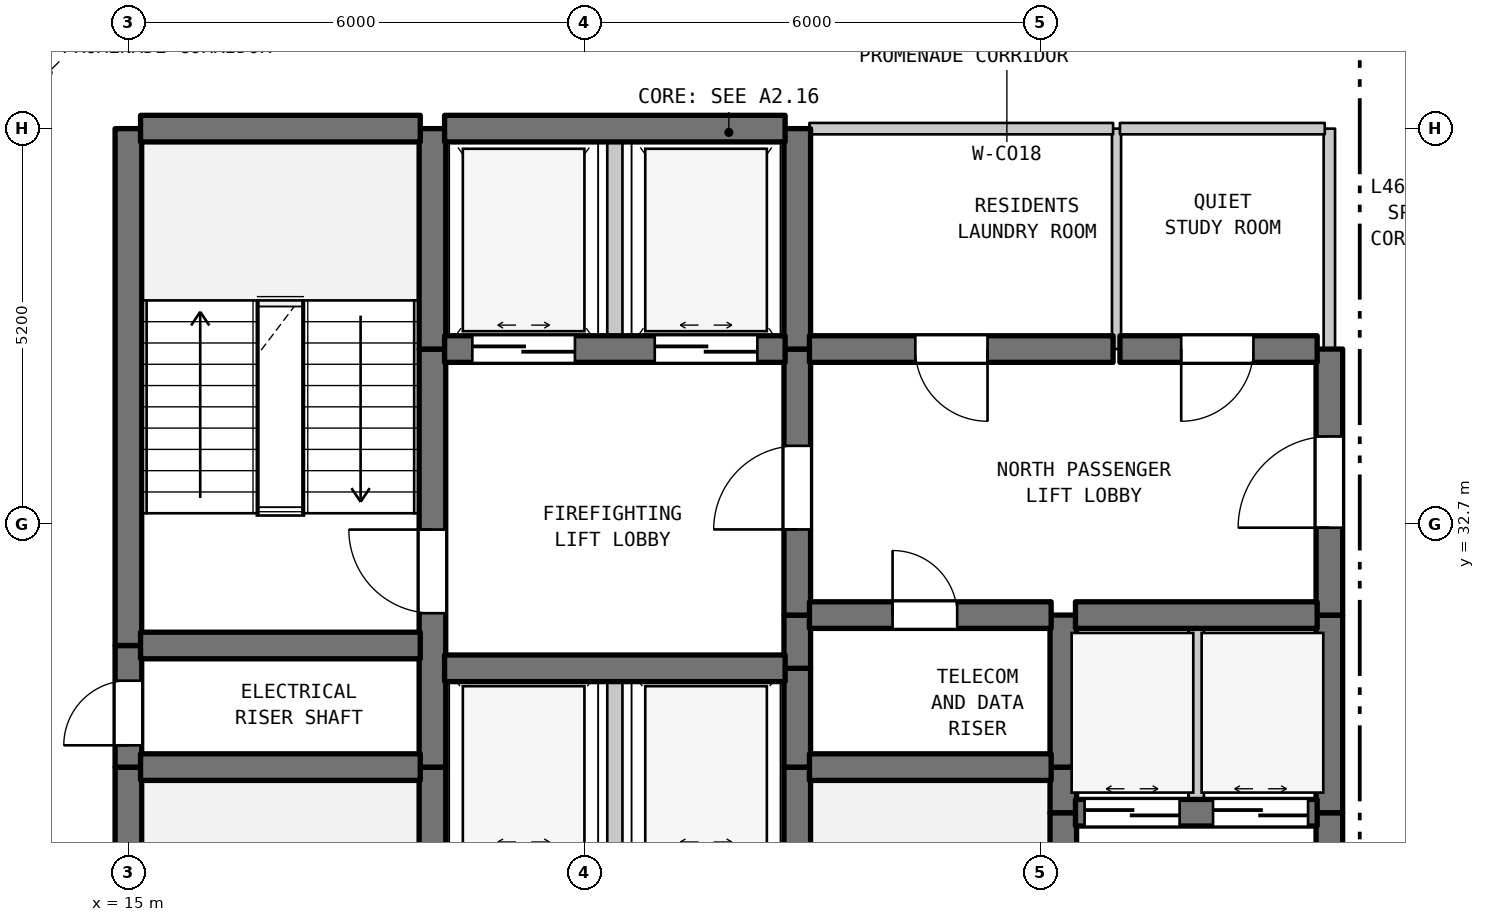
"""IFC4 building model, lengths in metres.
Left out: names, types, materials, properties, quantities, classifications, styles, units other than length and angle.
Written with IfcOpenShell. Run it as: python <this file> out.ifc"""

import sys

from ifc_helpers import new_model, si_unit, direction, frame, frame_2d, origin, place, context, subcontext, project, spatial, rectangle, extrude, element, fill, save


model = new_model("IFC4")
c1 = context("Model", 3, precision=1e-05, world=origin(), true_north=direction((0.0, 1.0)))
c2 = subcontext(c1, "Body", "Model", "MODEL_VIEW")
j1 = project(units=[si_unit("LENGTHUNIT", "METRE"), si_unit("PLANEANGLEUNIT", "RADIAN")], contexts=[c1])
p1 = place(None, origin())
s1 = spatial("IfcSite", under=j1, at=p1, CompositionType="ELEMENT")
p2 = place(p1, origin())
s2 = spatial("IfcBuilding", under=s1, at=p2, CompositionType="ELEMENT")
p3 = place(p2, frame((0.0, 0.0, 188.4)))
s3 = spatial("IfcBuildingStorey", under=s2, at=p3, CompositionType="ELEMENT", Elevation=188.4)
p4 = place(p3, frame((15.0, 22.7, 0.0), z_axis=(0.0, 0.0, 1.0), x_axis=(0.0, 1.0, 0.0)))
e1 = element("IfcWall", 1, at=p4, inside=s3, PredefinedType="SHEAR", context=c2, shape_type="SweptSolid", body=[
    extrude(rectangle(XDim=6.8, YDim=0.35, at=frame_2d((3.4, 0.0))), origin(), (0.0, 0.0, 1.0), 3.39),
])
p5 = place(p3, frame((15.0, 29.5, 0.0), z_axis=(0.0, 0.0, 1.0), x_axis=(0.0, 1.0, 0.0)))
e2 = element("IfcWall", 2, at=p5, inside=s3, PredefinedType="SHEAR", context=c2, shape_type="SweptSolid", body=[
    extrude(rectangle(XDim=1.6, YDim=0.35, at=frame_2d((0.8, 0.0))), origin(), (0.0, 0.0, 1.0), 3.39),
])
p6 = place(p5, frame((0.287, 0.0, 0.0)))
e3 = element("IfcOpeningElement", 3, at=p6, cuts=e2, PredefinedType="OPENING", context=c2, shape_type="SweptSolid", body=[
    extrude(rectangle(XDim=0.85, YDim=2.1, at=frame_2d((0.425, 1.05))), frame((0.0, 0.185, 0.0), z_axis=(0.0, -1.0, 0.0), x_axis=(1.0, 0.0, 0.0)), (0.0, 0.0, 1.0), 0.37),
])
p7 = place(p3, frame((15.0, 31.1, 0.0), z_axis=(0.0, 0.0, 1.0), x_axis=(0.0, 1.0, 0.0)))
e4 = element("IfcWall", 4, at=p7, inside=s3, PredefinedType="SHEAR", context=c2, shape_type="SweptSolid", body=[
    extrude(rectangle(XDim=6.8, YDim=0.35, at=frame_2d((3.4, 0.0))), origin(), (0.0, 0.0, 1.0), 3.39),
])
p8 = place(p3, frame((19.0, 28.2, 0.0), z_axis=(0.0, 0.0, 1.0), x_axis=(0.0, 1.0, 0.0)))
e5 = element("IfcWall", 5, at=p8, inside=s3, PredefinedType="SHEAR", context=c2, shape_type="SweptSolid", body=[
    extrude(rectangle(XDim=1.3, YDim=0.35, at=frame_2d((0.65, 0.0))), origin(), (0.0, 0.0, 1.0), 3.39),
])
p9 = place(p3, frame((19.0, 29.5, 0.0), z_axis=(0.0, 0.0, 1.0), x_axis=(0.0, 1.0, 0.0)))
e6 = element("IfcWall", 6, at=p9, inside=s3, PredefinedType="SHEAR", context=c2, shape_type="SweptSolid", body=[
    extrude(rectangle(XDim=5.5, YDim=0.35, at=frame_2d((2.75, 0.0))), origin(), (0.0, 0.0, 1.0), 3.39),
])
p10 = place(p9, frame((2.025, 0.0, 0.0)))
e7 = element("IfcOpeningElement", 7, at=p10, cuts=e6, PredefinedType="OPENING", context=c2, shape_type="SweptSolid", body=[
    extrude(rectangle(XDim=1.1, YDim=2.15, at=frame_2d((0.55, 1.075))), frame((0.0, 0.185, 0.0), z_axis=(0.0, -1.0, 0.0), x_axis=(1.0, 0.0, 0.0)), (0.0, 0.0, 1.0), 0.37),
])
p11 = place(p3, frame((19.0, 35.0, 0.0), z_axis=(0.0, 0.0, 1.0), x_axis=(0.0, 1.0, 0.0)))
e8 = element("IfcWall", 8, at=p11, inside=s3, PredefinedType="SHEAR", context=c2, shape_type="SweptSolid", body=[
    extrude(rectangle(XDim=2.9, YDim=0.35, at=frame_2d((1.45, 0.0))), origin(), (0.0, 0.0, 1.0), 3.39),
])
p12 = place(p3, frame((21.4, 28.2, 0.0), z_axis=(0.0, 0.0, 1.0), x_axis=(0.0, 1.0, 0.0)))
e9 = element("IfcWall", 9, at=p12, inside=s3, PredefinedType="STANDARD", context=c2, shape_type="SweptSolid", body=[
    extrude(rectangle(XDim=2.6, YDim=0.2, at=frame_2d((1.3, 0.0))), origin(), (0.0, 0.0, 1.0), 3.39),
])
p13 = place(p3, frame((21.4, 35.0, 0.0), z_axis=(0.0, 0.0, 1.0), x_axis=(0.0, 1.0, 0.0)))
e10 = element("IfcWall", 10, at=p13, inside=s3, PredefinedType="STANDARD", context=c2, shape_type="SweptSolid", body=[
    extrude(rectangle(XDim=2.9, YDim=0.2, at=frame_2d((1.45, 0.0))), origin(), (0.0, 0.0, 1.0), 3.39),
])
for number, where, z_axis, x_axis in (
    (11, (23.8, 28.2, 0.0), (0.0, 0.0, 1.0), (0.0, 1.0, 0.0)),
    (12, (23.8, 29.5, 0.0), (0.0, 0.0, 1.0), (0.0, 1.0, 0.0)),
):
    element("IfcWall", number, at=place(p3, frame(where, z_axis=z_axis, x_axis=x_axis)), inside=s3, PredefinedType="SHEAR", context=c2, shape_type="SweptSolid", body=[
        extrude(rectangle(XDim=1.3, YDim=0.35, at=frame_2d((0.65, 0.0))), origin(), (0.0, 0.0, 1.0), 3.39),
    ])
p14 = place(p3, frame((23.8, 30.8, 0.0), z_axis=(0.0, 0.0, 1.0), x_axis=(0.0, 1.0, 0.0)))
e13 = element("IfcWall", 13, at=p14, inside=s3, PredefinedType="SHEAR", context=c2, shape_type="SweptSolid", body=[
    extrude(rectangle(XDim=0.7, YDim=0.35, at=frame_2d((0.35, 0.0))), origin(), (0.0, 0.0, 1.0), 3.39),
])
p15 = place(p3, frame((23.8, 31.5, 0.0), z_axis=(0.0, 0.0, 1.0), x_axis=(0.0, 1.0, 0.0)))
e14 = element("IfcWall", 14, at=p15, inside=s3, PredefinedType="SHEAR", context=c2, shape_type="SweptSolid", body=[
    extrude(rectangle(XDim=3.5, YDim=0.35, at=frame_2d((1.75, 0.0))), origin(), (0.0, 0.0, 1.0), 3.39),
])
p16 = place(p15, frame((1.127, 0.0, 0.0)))
e15 = element("IfcOpeningElement", 15, at=p16, cuts=e14, PredefinedType="OPENING", context=c2, shape_type="SweptSolid", body=[
    extrude(rectangle(XDim=1.1, YDim=2.15, at=frame_2d((0.55, 1.075))), frame((0.0, 0.185, 0.0), z_axis=(0.0, -1.0, 0.0), x_axis=(1.0, 0.0, 0.0)), (0.0, 0.0, 1.0), 0.37),
])
p17 = place(p3, frame((23.8, 35.0, 0.0), z_axis=(0.0, 0.0, 1.0), x_axis=(0.0, 1.0, 0.0)))
e16 = element("IfcWall", 16, at=p17, inside=s3, PredefinedType="SHEAR", context=c2, shape_type="SweptSolid", body=[
    extrude(rectangle(XDim=2.9, YDim=0.35, at=frame_2d((1.45, 0.0))), origin(), (0.0, 0.0, 1.0), 3.39),
])
p18 = place(p3, frame((27.3, 25.6, 0.0), z_axis=(0.0, 0.0, 1.0), x_axis=(0.0, 1.0, 0.0)))
e17 = element("IfcWall", 17, at=p18, inside=s3, PredefinedType="SHEAR", context=c2, shape_type="SweptSolid", body=[
    extrude(rectangle(XDim=3.3, YDim=0.35, at=frame_2d((1.65, 0.0))), origin(), (0.0, 0.0, 1.0), 3.39),
])
p19 = place(p3, frame((27.3, 28.9, 0.0), z_axis=(0.0, 0.0, 1.0), x_axis=(0.0, 1.0, 0.0)))
e18 = element("IfcWall", 18, at=p19, inside=s3, PredefinedType="SHEAR", context=c2, shape_type="SweptSolid", body=[
    extrude(rectangle(XDim=0.6, YDim=0.35, at=frame_2d((0.3, 0.0))), origin(), (0.0, 0.0, 1.0), 3.39),
])
p20 = place(p3, frame((27.3, 29.5, 0.0), z_axis=(0.0, 0.0, 1.0), x_axis=(0.0, 1.0, 0.0)))
e19 = element("IfcWall", 19, at=p20, inside=s3, PredefinedType="SHEAR", context=c2, shape_type="SweptSolid", body=[
    extrude(rectangle(XDim=2.0, YDim=0.35, at=frame_2d((1.0, 0.0))), origin(), (0.0, 0.0, 1.0), 3.39),
])
p21 = place(p3, frame((28.0, 35.0, 0.0), z_axis=(0.0, 0.0, 1.0), x_axis=(0.0, 1.0, 0.0)))
e20 = element("IfcWall", 20, at=p21, inside=s3, PredefinedType="PARTITIONING", context=c2, shape_type="SweptSolid", body=[
    extrude(rectangle(XDim=2.9, YDim=0.12, at=frame_2d((1.45, 0.0))), origin(), (0.0, 0.0, 1.0), 3.39),
])
p22 = place(p3, frame((29.05, 28.9, 0.0), z_axis=(0.0, 0.0, 1.0), x_axis=(0.0, 1.0, 0.0)))
e21 = element("IfcWall", 21, at=p22, inside=s3, PredefinedType="STANDARD", context=c2, shape_type="SweptSolid", body=[
    extrude(rectangle(XDim=2.6, YDim=0.2, at=frame_2d((1.3, 0.0))), origin(), (0.0, 0.0, 1.0), 3.39),
])
p23 = place(p3, frame((30.8, 25.6, 0.0), z_axis=(0.0, 0.0, 1.0), x_axis=(0.0, 1.0, 0.0)))
e22 = element("IfcWall", 22, at=p23, inside=s3, PredefinedType="SHEAR", context=c2, shape_type="SweptSolid", body=[
    extrude(rectangle(XDim=3.3, YDim=0.35, at=frame_2d((1.65, 0.0))), origin(), (0.0, 0.0, 1.0), 3.39),
])
p24 = place(p23, frame((0.978, 0.0, 0.0)))
e23 = element("IfcOpeningElement", 23, at=p24, cuts=e22, PredefinedType="OPENING", context=c2, shape_type="SweptSolid", body=[
    extrude(rectangle(XDim=1.2, YDim=2.2, at=frame_2d((0.6, 1.1))), frame((0.0, 0.185, 0.0), z_axis=(0.0, -1.0, 0.0), x_axis=(1.0, 0.0, 0.0)), (0.0, 0.0, 1.0), 0.37),
])
p25 = place(p3, frame((30.8, 28.9, 0.0), z_axis=(0.0, 0.0, 1.0), x_axis=(0.0, 1.0, 0.0)))
e24 = element("IfcWall", 24, at=p25, inside=s3, PredefinedType="SHEAR", context=c2, shape_type="SweptSolid", body=[
    extrude(rectangle(XDim=2.6, YDim=0.35, at=frame_2d((1.3, 0.0))), origin(), (0.0, 0.0, 1.0), 3.39),
])
p26 = place(p3, frame((30.8, 31.5, 0.0), z_axis=(0.0, 0.0, 1.0), x_axis=(0.0, 1.0, 0.0)))
e25 = element("IfcWall", 25, at=p26, inside=s3, PredefinedType="SHEAR", context=c2, shape_type="SweptSolid", body=[
    extrude(rectangle(XDim=3.5, YDim=0.35, at=frame_2d((1.75, 0.0))), origin(), (0.0, 0.0, 1.0), 3.39),
])
p27 = place(p26, frame((1.15, 0.0, 0.0)))
e26 = element("IfcOpeningElement", 26, at=p27, cuts=e25, PredefinedType="OPENING", context=c2, shape_type="SweptSolid", body=[
    extrude(rectangle(XDim=1.2, YDim=2.2, at=frame_2d((0.6, 1.1))), frame((0.0, 0.185, 0.0), z_axis=(0.0, -1.0, 0.0), x_axis=(1.0, 0.0, 0.0)), (0.0, 0.0, 1.0), 0.37),
])
p28 = place(p3, frame((30.8, 35.0, 0.0), z_axis=(0.0, 0.0, 1.0), x_axis=(0.0, 1.0, 0.0)))
e27 = element("IfcWall", 27, at=p28, inside=s3, PredefinedType="STANDARD", context=c2, shape_type="SweptSolid", body=[
    extrude(rectangle(XDim=2.9, YDim=0.15, at=frame_2d((1.45, 0.0))), origin(), (0.0, 0.0, 1.0), 3.39),
])
p29 = place(p3, frame((27.46, 28.9, 0.0), z_axis=(0.0, 0.0, 1.0), x_axis=(1.0, 0.0, 0.0)))
e28 = element("IfcWall", 28, at=p29, inside=s3, PredefinedType="SHEAR", context=c2, shape_type="SweptSolid", body=[
    extrude(rectangle(XDim=3.18, YDim=0.35, at=frame_2d((1.59, 0.0))), origin(), (0.0, 0.0, 1.0), 3.39),
])
p30 = place(p29, frame((0.12, 0.0, 0.0)))
e29 = element("IfcOpeningElement", 29, at=p30, cuts=e28, PredefinedType="OPENING", context=c2, shape_type="SweptSolid", body=[
    extrude(rectangle(XDim=1.25, YDim=2.2, at=frame_2d((0.625, 1.1))), frame((0.0, 0.185, 0.0), z_axis=(0.0, -1.0, 0.0), x_axis=(1.0, 0.0, 0.0)), (0.0, 0.0, 1.0), 0.37),
])
p31 = place(p29, frame((1.81, 0.0, 0.0)))
e30 = element("IfcOpeningElement", 30, at=p31, cuts=e28, PredefinedType="OPENING", context=c2, shape_type="SweptSolid", body=[
    extrude(rectangle(XDim=1.25, YDim=2.2, at=frame_2d((0.625, 1.1))), frame((0.0, 0.185, 0.0), z_axis=(0.0, -1.0, 0.0), x_axis=(1.0, 0.0, 0.0)), (0.0, 0.0, 1.0), 0.37),
])
p32 = place(p3, frame((15.16, 29.5, 0.0), z_axis=(0.0, 0.0, 1.0), x_axis=(1.0, 0.0, 0.0)))
e31 = element("IfcWall", 31, at=p32, inside=s3, PredefinedType="SHEAR", context=c2, shape_type="SweptSolid", body=[
    extrude(rectangle(XDim=3.68, YDim=0.35, at=frame_2d((1.84, 0.0))), origin(), (0.0, 0.0, 1.0), 3.39),
])
p33 = place(p3, frame((23.96, 29.5, 0.0), z_axis=(0.0, 0.0, 1.0), x_axis=(1.0, 0.0, 0.0)))
e32 = element("IfcWall", 32, at=p33, inside=s3, PredefinedType="SHEAR", context=c2, shape_type="SweptSolid", body=[
    extrude(rectangle(XDim=3.18, YDim=0.35, at=frame_2d((1.59, 0.0))), origin(), (0.0, 0.0, 1.0), 3.39),
])
p34 = place(p3, frame((19.16, 30.8, 0.0), z_axis=(0.0, 0.0, 1.0), x_axis=(1.0, 0.0, 0.0)))
e33 = element("IfcWall", 33, at=p34, inside=s3, PredefinedType="SHEAR", context=c2, shape_type="SweptSolid", body=[
    extrude(rectangle(XDim=4.48, YDim=0.35, at=frame_2d((2.24, 0.0))), origin(), (0.0, 0.0, 1.0), 3.39),
])
p35 = place(p3, frame((15.16, 31.1, 0.0), z_axis=(0.0, 0.0, 1.0), x_axis=(1.0, 0.0, 0.0)))
e34 = element("IfcWall", 34, at=p35, inside=s3, PredefinedType="SHEAR", context=c2, shape_type="SweptSolid", body=[
    extrude(rectangle(XDim=3.68, YDim=0.35, at=frame_2d((1.84, 0.0))), origin(), (0.0, 0.0, 1.0), 3.39),
])
p36 = place(p3, frame((23.96, 31.5, 0.0), z_axis=(0.0, 0.0, 1.0), x_axis=(1.0, 0.0, 0.0)))
e35 = element("IfcWall", 35, at=p36, inside=s3, PredefinedType="SHEAR", context=c2, shape_type="SweptSolid", body=[
    extrude(rectangle(XDim=3.18, YDim=0.35, at=frame_2d((1.59, 0.0))), origin(), (0.0, 0.0, 1.0), 3.39),
])
p37 = place(p36, frame((1.094, 0.0, 0.0)))
e36 = element("IfcOpeningElement", 36, at=p37, cuts=e35, PredefinedType="OPENING", context=c2, shape_type="SweptSolid", body=[
    extrude(rectangle(XDim=0.85, YDim=2.1, at=frame_2d((0.425, 1.05))), frame((0.0, 0.185, 0.0), z_axis=(0.0, -1.0, 0.0), x_axis=(1.0, 0.0, 0.0)), (0.0, 0.0, 1.0), 0.37),
])
p38 = place(p3, frame((27.46, 31.5, 0.0), z_axis=(0.0, 0.0, 1.0), x_axis=(1.0, 0.0, 0.0)))
e37 = element("IfcWall", 37, at=p38, inside=s3, PredefinedType="SHEAR", context=c2, shape_type="SweptSolid", body=[
    extrude(rectangle(XDim=3.18, YDim=0.35, at=frame_2d((1.59, 0.0))), origin(), (0.0, 0.0, 1.0), 3.39),
])
p39 = place(p3, frame((19.16, 35.0, 0.0), z_axis=(0.0, 0.0, 1.0), x_axis=(1.0, 0.0, 0.0)))
e38 = element("IfcWall", 38, at=p39, inside=s3, PredefinedType="SHEAR", context=c2, shape_type="SweptSolid", body=[
    extrude(rectangle(XDim=4.48, YDim=0.35, at=frame_2d((2.24, 0.0))), origin(), (0.0, 0.0, 1.0), 3.39),
])
p40 = place(p39, frame((0.365, 0.0, 0.0)))
e39 = element("IfcOpeningElement", 39, at=p40, cuts=e38, PredefinedType="OPENING", context=c2, shape_type="SweptSolid", body=[
    extrude(rectangle(XDim=1.35, YDim=2.2, at=frame_2d((0.675, 1.1))), frame((0.0, 0.185, 0.0), z_axis=(0.0, -1.0, 0.0), x_axis=(1.0, 0.0, 0.0)), (0.0, 0.0, 1.0), 0.37),
])
p41 = place(p39, frame((2.765, 0.0, 0.0)))
e40 = element("IfcOpeningElement", 40, at=p41, cuts=e38, PredefinedType="OPENING", context=c2, shape_type="SweptSolid", body=[
    extrude(rectangle(XDim=1.35, YDim=2.2, at=frame_2d((0.675, 1.1))), frame((0.0, 0.185, 0.0), z_axis=(0.0, -1.0, 0.0), x_axis=(1.0, 0.0, 0.0)), (0.0, 0.0, 1.0), 0.37),
])
p42 = place(p3, frame((23.96, 35.0, 0.0), z_axis=(0.0, 0.0, 1.0), x_axis=(1.0, 0.0, 0.0)))
e41 = element("IfcWall", 41, at=p42, inside=s3, PredefinedType="SHEAR", context=c2, shape_type="SweptSolid", body=[
    extrude(rectangle(XDim=3.995, YDim=0.35, at=frame_2d((1.998, 0.0))), origin(), (0.0, 0.0, 1.0), 3.39),
])
p43 = place(p42, frame((1.393, 0.0, 0.0)))
e42 = element("IfcOpeningElement", 42, at=p43, cuts=e41, PredefinedType="OPENING", context=c2, shape_type="SweptSolid", body=[
    extrude(rectangle(XDim=0.95, YDim=2.15, at=frame_2d((0.475, 1.075))), frame((0.0, 0.185, 0.0), z_axis=(0.0, -1.0, 0.0), x_axis=(1.0, 0.0, 0.0)), (0.0, 0.0, 1.0), 0.37),
])
p44 = place(p3, frame((28.045, 35.0, 0.0), z_axis=(0.0, 0.0, 1.0), x_axis=(1.0, 0.0, 0.0)))
e43 = element("IfcWall", 43, at=p44, inside=s3, PredefinedType="SHEAR", context=c2, shape_type="SweptSolid", body=[
    extrude(rectangle(XDim=2.595, YDim=0.35, at=frame_2d((1.297, 0.0))), origin(), (0.0, 0.0, 1.0), 3.39),
])
p45 = place(p44, frame((0.806, 0.0, 0.0)))
e44 = element("IfcOpeningElement", 44, at=p45, cuts=e43, PredefinedType="OPENING", context=c2, shape_type="SweptSolid", body=[
    extrude(rectangle(XDim=0.95, YDim=2.15, at=frame_2d((0.475, 1.075))), frame((0.0, 0.185, 0.0), z_axis=(0.0, -1.0, 0.0), x_axis=(1.0, 0.0, 0.0)), (0.0, 0.0, 1.0), 0.37),
])
p46 = place(p3, frame((15.16, 37.9, 0.0), z_axis=(0.0, 0.0, 1.0), x_axis=(1.0, 0.0, 0.0)))
e45 = element("IfcWall", 45, at=p46, inside=s3, PredefinedType="SHEAR", context=c2, shape_type="SweptSolid", body=[
    extrude(rectangle(XDim=3.68, YDim=0.35, at=frame_2d((1.84, 0.0))), origin(), (0.0, 0.0, 1.0), 3.39),
])
p47 = place(p3, frame((19.16, 37.9, 0.0), z_axis=(0.0, 0.0, 1.0), x_axis=(1.0, 0.0, 0.0)))
e46 = element("IfcWall", 46, at=p47, inside=s3, PredefinedType="SHEAR", context=c2, shape_type="SweptSolid", body=[
    extrude(rectangle(XDim=4.48, YDim=0.35, at=frame_2d((2.24, 0.0))), origin(), (0.0, 0.0, 1.0), 3.39),
])
p48 = place(p3, frame((23.96, 37.9, 0.0), z_axis=(0.0, 0.0, 1.0), x_axis=(1.0, 0.0, 0.0)))
e47 = element("IfcWall", 47, at=p48, inside=s3, PredefinedType="STANDARD", context=c2, shape_type="SweptSolid", body=[
    extrude(rectangle(XDim=3.995, YDim=0.15, at=frame_2d((1.998, 0.0))), origin(), (0.0, 0.0, 1.0), 2.89),
])
p49 = place(p3, frame((28.045, 37.9, 0.0), z_axis=(0.0, 0.0, 1.0), x_axis=(1.0, 0.0, 0.0)))
e48 = element("IfcWall", 48, at=p49, inside=s3, PredefinedType="STANDARD", context=c2, shape_type="SweptSolid", body=[
    extrude(rectangle(XDim=2.695, YDim=0.15, at=frame_2d((1.348, 0.0))), origin(), (0.0, 0.0, 1.0), 2.89),
])
p50 = place(p6, origin())
e49 = element("IfcDoor", 49, at=p50, inside=s3, OperationType="SINGLE_SWING_LEFT", PredefinedType="DOOR", context=c2, shape_type="SweptSolid", body=[
    extrude(rectangle(XDim=0.85, YDim=2.1, at=frame_2d((0.425, 1.05))), frame((0.0, 0.025, 0.0), z_axis=(0.0, -1.0, 0.0), x_axis=(1.0, 0.0, 0.0)), (0.0, 0.0, 1.0), 0.05),
])
fill(e3, e49)
p51 = place(p10, origin())
e50 = element("IfcDoor", 50, at=p51, inside=s3, OperationType="SINGLE_SWING_RIGHT", PredefinedType="DOOR", context=c2, shape_type="SweptSolid", body=[
    extrude(rectangle(XDim=1.1, YDim=2.15, at=frame_2d((0.55, 1.075))), frame((0.0, 0.025, 0.0), z_axis=(0.0, -1.0, 0.0), x_axis=(1.0, 0.0, 0.0)), (0.0, 0.0, 1.0), 0.05),
])
fill(e7, e50)
p52 = place(p16, origin())
e51 = element("IfcDoor", 51, at=p52, inside=s3, OperationType="SINGLE_SWING_LEFT", PredefinedType="DOOR", context=c2, shape_type="SweptSolid", body=[
    extrude(rectangle(XDim=1.1, YDim=2.15, at=frame_2d((0.55, 1.075))), frame((0.0, 0.025, 0.0), z_axis=(0.0, -1.0, 0.0), x_axis=(1.0, 0.0, 0.0)), (0.0, 0.0, 1.0), 0.05),
])
fill(e15, e51)
p53 = place(p27, origin())
e52 = element("IfcDoor", 52, at=p53, inside=s3, OperationType="SINGLE_SWING_LEFT", PredefinedType="DOOR", context=c2, shape_type="SweptSolid", body=[
    extrude(rectangle(XDim=1.2, YDim=2.2, at=frame_2d((0.6, 1.1))), frame((0.0, 0.025, 0.0), z_axis=(0.0, -1.0, 0.0), x_axis=(1.0, 0.0, 0.0)), (0.0, 0.0, 1.0), 0.05),
])
fill(e26, e52)
p54 = place(p30, origin())
e53 = element("IfcDoor", 53, at=p54, inside=s3, OperationType="DOUBLE_DOOR_SLIDING", PredefinedType="DOOR", context=c2, shape_type="SweptSolid", body=[
    extrude(rectangle(XDim=1.25, YDim=2.2, at=frame_2d((0.625, 1.1))), frame((0.0, 0.025, 0.0), z_axis=(0.0, -1.0, 0.0), x_axis=(1.0, 0.0, 0.0)), (0.0, 0.0, 1.0), 0.05),
])
fill(e29, e53)
p55 = place(p31, origin())
e54 = element("IfcDoor", 54, at=p55, inside=s3, OperationType="DOUBLE_DOOR_SLIDING", PredefinedType="DOOR", context=c2, shape_type="SweptSolid", body=[
    extrude(rectangle(XDim=1.25, YDim=2.2, at=frame_2d((0.625, 1.1))), frame((0.0, 0.025, 0.0), z_axis=(0.0, -1.0, 0.0), x_axis=(1.0, 0.0, 0.0)), (0.0, 0.0, 1.0), 0.05),
])
fill(e30, e54)
p56 = place(p37, origin())
e55 = element("IfcDoor", 55, at=p56, inside=s3, OperationType="SINGLE_SWING_LEFT", PredefinedType="DOOR", context=c2, shape_type="SweptSolid", body=[
    extrude(rectangle(XDim=0.85, YDim=2.1, at=frame_2d((0.425, 1.05))), frame((0.0, 0.025, 0.0), z_axis=(0.0, -1.0, 0.0), x_axis=(1.0, 0.0, 0.0)), (0.0, 0.0, 1.0), 0.05),
])
fill(e36, e55)
p57 = place(p40, origin())
e56 = element("IfcDoor", 56, at=p57, inside=s3, OperationType="DOUBLE_DOOR_SLIDING", PredefinedType="DOOR", context=c2, shape_type="SweptSolid", body=[
    extrude(rectangle(XDim=1.35, YDim=2.2, at=frame_2d((0.675, 1.1))), frame((0.0, 0.025, 0.0), z_axis=(0.0, -1.0, 0.0), x_axis=(1.0, 0.0, 0.0)), (0.0, 0.0, 1.0), 0.05),
])
fill(e39, e56)
p58 = place(p41, origin())
e57 = element("IfcDoor", 57, at=p58, inside=s3, OperationType="DOUBLE_DOOR_SLIDING", PredefinedType="DOOR", context=c2, shape_type="SweptSolid", body=[
    extrude(rectangle(XDim=1.35, YDim=2.2, at=frame_2d((0.675, 1.1))), frame((0.0, 0.025, 0.0), z_axis=(0.0, -1.0, 0.0), x_axis=(1.0, 0.0, 0.0)), (0.0, 0.0, 1.0), 0.05),
])
fill(e40, e57)
p59 = place(p43, frame((0.95, 0.0, 0.0), z_axis=(0.0, 0.0, 1.0), x_axis=(-1.0, 0.0, 0.0)))
e58 = element("IfcDoor", 58, at=p59, inside=s3, OperationType="SINGLE_SWING_RIGHT", PredefinedType="DOOR", context=c2, shape_type="SweptSolid", body=[
    extrude(rectangle(XDim=0.95, YDim=2.15, at=frame_2d((0.475, 1.075))), frame((0.0, 0.025, 0.0), z_axis=(0.0, -1.0, 0.0), x_axis=(1.0, 0.0, 0.0)), (0.0, 0.0, 1.0), 0.05),
])
fill(e42, e58)
p60 = place(p45, frame((0.95, 0.0, 0.0), z_axis=(0.0, 0.0, 1.0), x_axis=(-1.0, 0.0, 0.0)))
e59 = element("IfcDoor", 59, at=p60, inside=s3, OperationType="SINGLE_SWING_LEFT", PredefinedType="DOOR", context=c2, shape_type="SweptSolid", body=[
    extrude(rectangle(XDim=0.95, YDim=2.15, at=frame_2d((0.475, 1.075))), frame((0.0, 0.025, 0.0), z_axis=(0.0, -1.0, 0.0), x_axis=(1.0, 0.0, 0.0)), (0.0, 0.0, 1.0), 0.05),
])
fill(e44, e59)
save(model, sys.argv[1])
